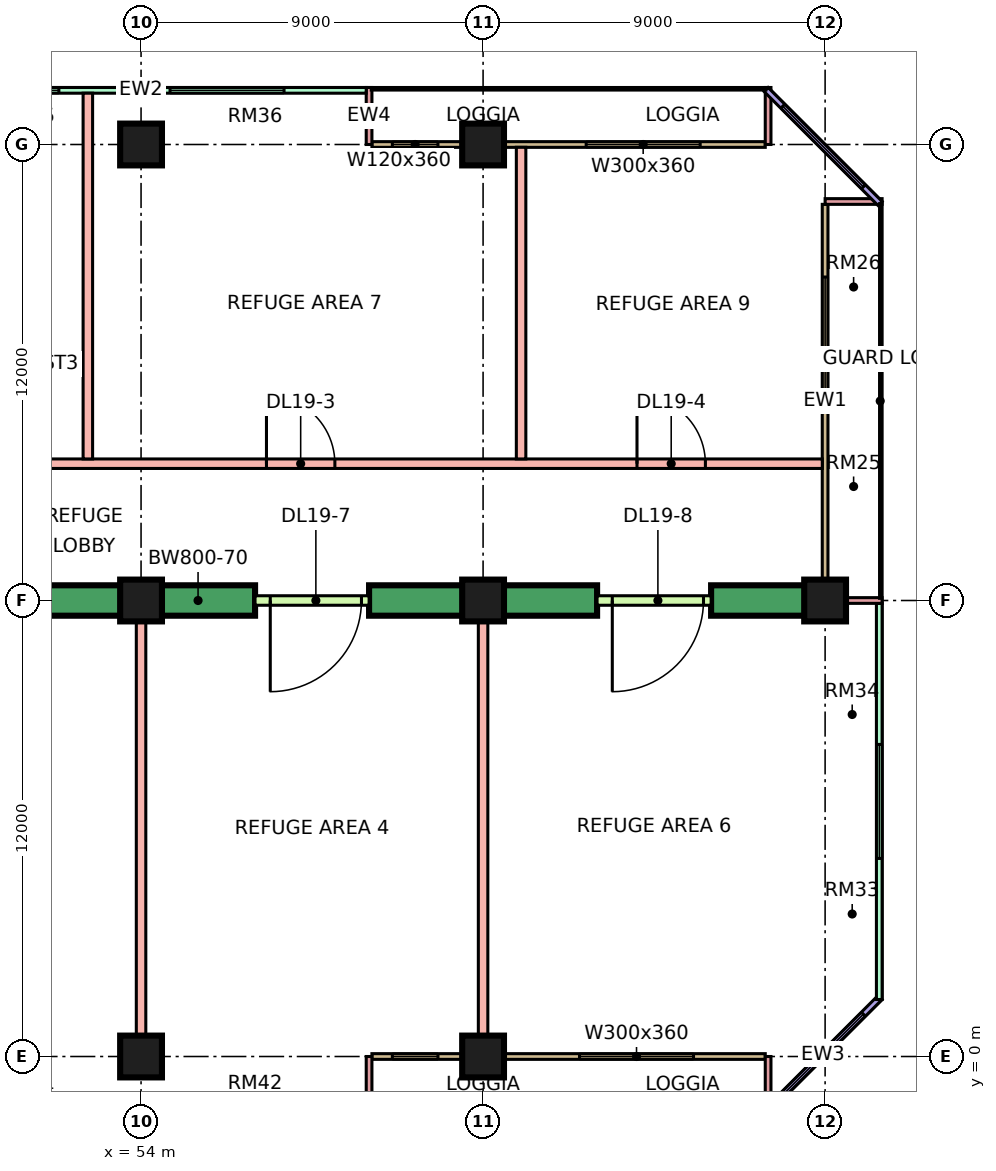
"""IFC4 building model, lengths in metres.
Left out: names, types, materials, properties, quantities, classifications, styles, units other than length and angle.
Written with IfcOpenShell. Run it as: python <this file> out.ifc"""

import sys

from ifc_helpers import new_model, si_unit, direction, frame, frame_2d, origin, origin_2d, place, context, subcontext, project, spatial, rectangle, extrude, element, fill, save


model = new_model("IFC4")
c1 = context("Model", 3, precision=1e-05, world=origin(), true_north=direction((0.0, 1.0)))
c2 = subcontext(c1, "Body", "Model", "MODEL_VIEW")
j1 = project(units=[si_unit("LENGTHUNIT", "METRE"), si_unit("PLANEANGLEUNIT", "RADIAN")], contexts=[c1])
p1 = place(None, origin())
s1 = spatial("IfcSite", under=j1, at=p1, CompositionType="ELEMENT")
p2 = place(p1, origin())
s2 = spatial("IfcBuilding", under=s1, at=p2, CompositionType="ELEMENT")
p3 = place(p2, frame((0.0, 0.0, 86.4)))
s3 = spatial("IfcBuildingStorey", under=s2, at=p3, CompositionType="ELEMENT", Elevation=86.4)
p4 = place(p3, frame((54.0, 0.0, 0.0), z_axis=(0.0, 0.0, 1.0), x_axis=(1.0, 0.0, 0.0)))
e1 = element("IfcColumn", 1, at=p4, inside=s3, PredefinedType="COLUMN", context=c2, shape_type="SweptSolid", body=[
    extrude(rectangle(XDim=1.1, YDim=1.1, at=origin_2d()), origin(), (0.0, 0.0, 1.0), 5.5),
])
p5 = place(p3, frame((54.0, 12.0, 0.0), z_axis=(0.0, 0.0, 1.0), x_axis=(1.0, 0.0, 0.0)))
e2 = element("IfcColumn", 2, at=p5, inside=s3, PredefinedType="COLUMN", context=c2, shape_type="SweptSolid", body=[
    extrude(rectangle(XDim=1.1, YDim=1.1, at=origin_2d()), origin(), (0.0, 0.0, 1.0), 5.5),
])
for number, where, z_axis, x_axis in (
    (3, (54.0, 24.0, 0.0), (0.0, 0.0, 1.0), (1.0, 0.0, 0.0)),
    (4, (63.0, 0.0, 0.0), (0.0, 0.0, 1.0), (1.0, 0.0, 0.0)),
):
    element("IfcColumn", number, at=place(p3, frame(where, z_axis=z_axis, x_axis=x_axis)), inside=s3, PredefinedType="COLUMN", context=c2, shape_type="SweptSolid", body=[
        extrude(rectangle(XDim=1.1, YDim=1.1, at=origin_2d()), origin(), (0.0, 0.0, 1.0), 5.5),
    ])
p6 = place(p3, frame((63.0, 12.0, 0.0), z_axis=(0.0, 0.0, 1.0), x_axis=(1.0, 0.0, 0.0)))
e5 = element("IfcColumn", 5, at=p6, inside=s3, PredefinedType="COLUMN", context=c2, shape_type="SweptSolid", body=[
    extrude(rectangle(XDim=1.1, YDim=1.1, at=origin_2d()), origin(), (0.0, 0.0, 1.0), 5.5),
])
for number, where, z_axis, x_axis in (
    (6, (63.0, 24.0, 0.0), (0.0, 0.0, 1.0), (1.0, 0.0, 0.0)),
    (7, (72.0, 12.0, 0.0), (0.0, 0.0, 1.0), (1.0, 0.0, 0.0)),
):
    element("IfcColumn", number, at=place(p3, frame(where, z_axis=z_axis, x_axis=x_axis)), inside=s3, PredefinedType="COLUMN", context=c2, shape_type="SweptSolid", body=[
        extrude(rectangle(XDim=1.1, YDim=1.1, at=origin_2d()), origin(), (0.0, 0.0, 1.0), 5.5),
    ])
p7 = place(p3, frame((51.0, 12.0, 0.0), z_axis=(0.0, 0.0, 1.0), x_axis=(1.0, 0.0, 0.0)))
e8 = element("IfcWall", 8, at=p7, inside=s3, PredefinedType="SHEAR", context=c2, shape_type="SweptSolid", body=[
    extrude(rectangle(XDim=3.0, YDim=0.8, at=frame_2d((1.5, 0.0))), origin(), (0.0, 0.0, 1.0), 5.1),
])
e9 = element("IfcWall", 9, at=p5, inside=s3, PredefinedType="SHEAR", context=c2, shape_type="SweptSolid", body=[
    extrude(rectangle(XDim=3.0, YDim=0.8, at=frame_2d((1.5, 0.0))), origin(), (0.0, 0.0, 1.0), 5.1),
])
p8 = place(p3, frame((60.0, 12.0, 0.0), z_axis=(0.0, 0.0, 1.0), x_axis=(1.0, 0.0, 0.0)))
e10 = element("IfcWall", 10, at=p8, inside=s3, PredefinedType="SHEAR", context=c2, shape_type="SweptSolid", body=[
    extrude(rectangle(XDim=3.0, YDim=0.8, at=frame_2d((1.5, 0.0))), origin(), (0.0, 0.0, 1.0), 5.1),
])
e11 = element("IfcWall", 11, at=p6, inside=s3, PredefinedType="SHEAR", context=c2, shape_type="SweptSolid", body=[
    extrude(rectangle(XDim=3.0, YDim=0.8, at=frame_2d((1.5, 0.0))), origin(), (0.0, 0.0, 1.0), 5.1),
])
p9 = place(p3, frame((69.0, 12.0, 0.0), z_axis=(0.0, 0.0, 1.0), x_axis=(1.0, 0.0, 0.0)))
e12 = element("IfcWall", 12, at=p9, inside=s3, PredefinedType="SHEAR", context=c2, shape_type="SweptSolid", body=[
    extrude(rectangle(XDim=3.0, YDim=0.8, at=frame_2d((1.5, 0.0))), origin(), (0.0, 0.0, 1.0), 5.1),
])
p10 = place(p3, frame((70.425, 24.0, 0.0), z_axis=(0.0, 0.0, 1.0), x_axis=(-1.0, 0.0, 0.0)))
e13 = element("IfcWall", 13, at=p10, inside=s3, PredefinedType="SOLIDWALL", context=c2, shape_type="SweptSolid", body=[
    extrude(rectangle(XDim=10.35, YDim=0.15, at=frame_2d((5.175, 0.0))), origin(), (0.0, 0.0, 1.0), 5.1),
])
p11 = place(p10, frame((1.712, 0.0, 0.45)))
e14 = element("IfcOpeningElement", 14, at=p11, cuts=e13, PredefinedType="OPENING", context=c2, shape_type="SweptSolid", body=[
    extrude(rectangle(XDim=3.0, YDim=3.6, at=frame_2d((1.5, 1.8))), frame((0.0, 0.085, 0.0), z_axis=(0.0, -1.0, 0.0), x_axis=(1.0, 0.0, 0.0)), (0.0, 0.0, 1.0), 0.17),
])
p12 = place(p10, frame((8.613, 0.0, 0.45)))
e15 = element("IfcOpeningElement", 15, at=p12, cuts=e13, PredefinedType="OPENING", context=c2, shape_type="SweptSolid", body=[
    extrude(rectangle(XDim=1.2, YDim=3.6, at=frame_2d((0.6, 1.8))), frame((0.0, 0.085, 0.0), z_axis=(0.0, -1.0, 0.0), x_axis=(1.0, 0.0, 0.0)), (0.0, 0.0, 1.0), 0.17),
])
for number, where, z_axis, x_axis in (
    (16, (70.5, 25.5, 0.0), (0.0, 0.0, 1.0), (0.0, -1.0, 0.0)),
    (17, (60.0, 25.5, 0.0), (0.0, 0.0, 1.0), (0.0, -1.0, 0.0)),
):
    element("IfcWall", number, at=place(p3, frame(where, z_axis=z_axis, x_axis=x_axis)), inside=s3, PredefinedType="SOLIDWALL", context=c2, shape_type="SweptSolid", body=[
        extrude(rectangle(XDim=1.5, YDim=0.15, at=frame_2d((0.75, 0.0))), origin(), (0.0, 0.0, 1.0), 5.1),
    ])
p13 = place(p3, frame((59.925, 25.425, 0.0), z_axis=(0.0, 0.0, 1.0), x_axis=(-1.0, 0.0, 0.0)))
e18 = element("IfcWall", 18, at=p13, inside=s3, PredefinedType="SOLIDWALL", context=c2, shape_type="SweptSolid", body=[
    extrude(rectangle(XDim=11.85, YDim=0.15, at=frame_2d((5.925, 0.0))), origin(), (0.0, 0.0, 1.0), 5.1),
])
p14 = place(p13, frame((2.163, 0.0, 0.45)))
e19 = element("IfcOpeningElement", 19, at=p14, cuts=e18, PredefinedType="OPENING", context=c2, shape_type="SweptSolid", body=[
    extrude(rectangle(XDim=3.0, YDim=3.6, at=frame_2d((1.5, 1.8))), frame((0.0, 0.085, 0.0), z_axis=(0.0, -1.0, 0.0), x_axis=(1.0, 0.0, 0.0)), (0.0, 0.0, 1.0), 0.17),
])
p15 = place(p13, frame((8.087, 0.0, 0.45)))
e20 = element("IfcOpeningElement", 20, at=p15, cuts=e18, PredefinedType="OPENING", context=c2, shape_type="SweptSolid", body=[
    extrude(rectangle(XDim=3.0, YDim=3.6, at=frame_2d((1.5, 1.8))), frame((0.0, 0.085, 0.0), z_axis=(0.0, -1.0, 0.0), x_axis=(1.0, 0.0, 0.0)), (0.0, 0.0, 1.0), 0.17),
])
p16 = place(p3, frame((60.075, 0.0, 0.0), z_axis=(0.0, 0.0, 1.0), x_axis=(1.0, 0.0, 0.0)))
e21 = element("IfcWall", 21, at=p16, inside=s3, PredefinedType="SOLIDWALL", context=c2, shape_type="SweptSolid", body=[
    extrude(rectangle(XDim=10.35, YDim=0.15, at=frame_2d((5.175, 0.0))), origin(), (0.0, 0.0, 1.0), 5.1),
])
p17 = place(p16, frame((0.538, 0.0, 0.45)))
e22 = element("IfcOpeningElement", 22, at=p17, cuts=e21, PredefinedType="OPENING", context=c2, shape_type="SweptSolid", body=[
    extrude(rectangle(XDim=1.2, YDim=3.6, at=frame_2d((0.6, 1.8))), frame((0.0, 0.085, 0.0), z_axis=(0.0, -1.0, 0.0), x_axis=(1.0, 0.0, 0.0)), (0.0, 0.0, 1.0), 0.17),
])
p18 = place(p16, frame((5.462, 0.0, 0.45)))
e23 = element("IfcOpeningElement", 23, at=p18, cuts=e21, PredefinedType="OPENING", context=c2, shape_type="SweptSolid", body=[
    extrude(rectangle(XDim=3.0, YDim=3.6, at=frame_2d((1.5, 1.8))), frame((0.0, 0.085, 0.0), z_axis=(0.0, -1.0, 0.0), x_axis=(1.0, 0.0, 0.0)), (0.0, 0.0, 1.0), 0.17),
])
for number, where, z_axis, x_axis in (
    (24, (60.0, -1.5, 0.0), (0.0, 0.0, 1.0), (0.0, 1.0, 0.0)),
    (25, (70.5, -1.5, 0.0), (0.0, 0.0, 1.0), (0.0, 1.0, 0.0)),
):
    element("IfcWall", number, at=place(p3, frame(where, z_axis=z_axis, x_axis=x_axis)), inside=s3, PredefinedType="SOLIDWALL", context=c2, shape_type="SweptSolid", body=[
        extrude(rectangle(XDim=1.5, YDim=0.15, at=frame_2d((0.75, 0.0))), origin(), (0.0, 0.0, 1.0), 5.1),
    ])
p19 = place(p3, frame((70.447, -1.447, 0.0), z_axis=(0.0, 0.0, 1.0), x_axis=(0.707106781187, 0.707106781187, 0.0)))
e26 = element("IfcWall", 26, at=p19, inside=s3, PredefinedType="SOLIDWALL", context=c2, shape_type="SweptSolid", body=[
    extrude(rectangle(XDim=4.243, YDim=0.15, at=frame_2d((2.121, 0.0))), origin(), (0.0, 0.0, 1.0), 5.1),
])
p20 = place(p19, frame((0.621, 0.0, 0.45)))
e27 = element("IfcOpeningElement", 27, at=p20, cuts=e26, PredefinedType="OPENING", context=c2, shape_type="SweptSolid", body=[
    extrude(rectangle(XDim=3.0, YDim=3.6, at=frame_2d((1.5, 1.8))), frame((0.0, 0.085, 0.0), z_axis=(0.0, -1.0, 0.0), x_axis=(1.0, 0.0, 0.0)), (0.0, 0.0, 1.0), 0.17),
])
p21 = place(p3, frame((73.425, 1.5, 0.0), z_axis=(0.0, 0.0, 1.0), x_axis=(0.0, 1.0, 0.0)))
e28 = element("IfcWall", 28, at=p21, inside=s3, PredefinedType="SOLIDWALL", context=c2, shape_type="SweptSolid", body=[
    extrude(rectangle(XDim=10.425, YDim=0.15, at=frame_2d((5.212, 0.0))), origin(), (0.0, 0.0, 1.0), 5.1),
])
p22 = place(p21, frame((3.712, 0.0, 0.45)))
e29 = element("IfcOpeningElement", 29, at=p22, cuts=e28, PredefinedType="OPENING", context=c2, shape_type="SweptSolid", body=[
    extrude(rectangle(XDim=3.0, YDim=3.6, at=frame_2d((1.5, 1.8))), frame((0.0, 0.085, 0.0), z_axis=(0.0, -1.0, 0.0), x_axis=(1.0, 0.0, 0.0)), (0.0, 0.0, 1.0), 0.17),
])
p23 = place(p3, frame((72.0, 12.075, 0.0), z_axis=(0.0, 0.0, 1.0), x_axis=(0.0, 1.0, 0.0)))
e30 = element("IfcWall", 30, at=p23, inside=s3, PredefinedType="SOLIDWALL", context=c2, shape_type="SweptSolid", body=[
    extrude(rectangle(XDim=10.35, YDim=0.15, at=frame_2d((5.175, 0.0))), origin(), (0.0, 0.0, 1.0), 5.1),
])
p24 = place(p23, frame((5.438, 0.0, 0.45)))
e31 = element("IfcOpeningElement", 31, at=p24, cuts=e30, PredefinedType="OPENING", context=c2, shape_type="SweptSolid", body=[
    extrude(rectangle(XDim=3.0, YDim=3.6, at=frame_2d((1.5, 1.8))), frame((0.0, 0.085, 0.0), z_axis=(0.0, -1.0, 0.0), x_axis=(1.0, 0.0, 0.0)), (0.0, 0.0, 1.0), 0.17),
])
for number, where, z_axis, x_axis in (
    (32, (73.5, 12.0, 0.0), (0.0, 0.0, 1.0), (-1.0, 0.0, 0.0)),
    (33, (73.5, 22.5, 0.0), (0.0, 0.0, 1.0), (-1.0, 0.0, 0.0)),
):
    element("IfcWall", number, at=place(p3, frame(where, z_axis=z_axis, x_axis=x_axis)), inside=s3, PredefinedType="SOLIDWALL", context=c2, shape_type="SweptSolid", body=[
        extrude(rectangle(XDim=1.5, YDim=0.15, at=frame_2d((0.75, 0.0))), origin(), (0.0, 0.0, 1.0), 5.1),
    ])
p25 = place(p3, frame((73.447, 22.447, 0.0), z_axis=(0.0, 0.0, 1.0), x_axis=(-0.707106781187, 0.707106781187, 0.0)))
e34 = element("IfcWall", 34, at=p25, inside=s3, PredefinedType="SOLIDWALL", context=c2, shape_type="SweptSolid", body=[
    extrude(rectangle(XDim=4.243, YDim=0.15, at=frame_2d((2.121, 0.0))), origin(), (0.0, 0.0, 1.0), 5.1),
])
p26 = place(p25, frame((0.621, 0.0, 0.45)))
e35 = element("IfcOpeningElement", 35, at=p26, cuts=e34, PredefinedType="OPENING", context=c2, shape_type="SweptSolid", body=[
    extrude(rectangle(XDim=3.0, YDim=3.6, at=frame_2d((1.5, 1.8))), frame((0.0, 0.085, 0.0), z_axis=(0.0, -1.0, 0.0), x_axis=(1.0, 0.0, 0.0)), (0.0, 0.0, 1.0), 0.17),
])
p27 = place(p3, frame((51.225, 15.6, 0.0), z_axis=(0.0, 0.0, 1.0), x_axis=(1.0, 0.0, 0.0)))
e36 = element("IfcWall", 36, at=p27, inside=s3, PredefinedType="PARTITIONING", context=c2, shape_type="SweptSolid", body=[
    extrude(rectangle(XDim=20.701, YDim=0.25, at=frame_2d((10.351, 0.0))), origin(), (0.0, 0.0, 1.0), 5.1),
])
p28 = place(p27, frame((6.075, 0.0, 0.0)))
e37 = element("IfcOpeningElement", 37, at=p28, cuts=e36, PredefinedType="OPENING", context=c2, shape_type="SweptSolid", body=[
    extrude(rectangle(XDim=1.8, YDim=2.1, at=frame_2d((0.9, 1.05))), frame((0.0, 0.135, 0.0), z_axis=(0.0, -1.0, 0.0), x_axis=(1.0, 0.0, 0.0)), (0.0, 0.0, 1.0), 0.27),
])
p29 = place(p27, frame((15.825, 0.0, 0.0)))
e38 = element("IfcOpeningElement", 38, at=p29, cuts=e36, PredefinedType="OPENING", context=c2, shape_type="SweptSolid", body=[
    extrude(rectangle(XDim=1.8, YDim=2.1, at=frame_2d((0.9, 1.05))), frame((0.0, 0.135, 0.0), z_axis=(0.0, -1.0, 0.0), x_axis=(1.0, 0.0, 0.0)), (0.0, 0.0, 1.0), 0.27),
])
p30 = place(p3, frame((52.6, 15.725, 0.0), z_axis=(0.0, 0.0, 1.0), x_axis=(0.0, 1.0, 0.0)))
e39 = element("IfcWall", 39, at=p30, inside=s3, PredefinedType="PARTITIONING", context=c2, shape_type="SweptSolid", body=[
    extrude(rectangle(XDim=9.625, YDim=0.25, at=frame_2d((4.812, 0.0))), origin(), (0.0, 0.0, 1.0), 5.1),
])
p31 = place(p3, frame((54.0, 0.0, 0.0), z_axis=(0.0, 0.0, 1.0), x_axis=(0.0, 1.0, 0.0)))
e40 = element("IfcWall", 40, at=p31, inside=s3, PredefinedType="PARTITIONING", context=c2, shape_type="SweptSolid", body=[
    extrude(rectangle(XDim=11.601, YDim=0.25, at=frame_2d((5.801, 0.0))), origin(), (0.0, 0.0, 1.0), 5.1),
])
p32 = place(p3, frame((56.999, 12.0, 0.0), z_axis=(0.0, 0.0, 1.0), x_axis=(1.0, 0.0, 0.0)))
e41 = element("IfcWall", 41, at=p32, inside=s3, PredefinedType="PARTITIONING", context=c2, shape_type="SweptSolid", body=[
    extrude(rectangle(XDim=3.002, YDim=0.25, at=frame_2d((1.501, 0.0))), origin(), (0.0, 0.0, 1.0), 3.05),
])
p33 = place(p32, frame((0.401, 0.0, 0.0)))
e42 = element("IfcOpeningElement", 42, at=p33, cuts=e41, PredefinedType="OPENING", context=c2, shape_type="SweptSolid", body=[
    extrude(rectangle(XDim=2.4, YDim=2.1, at=frame_2d((1.2, 1.05))), frame((0.0, 0.135, 0.0), z_axis=(0.0, -1.0, 0.0), x_axis=(1.0, 0.0, 0.0)), (0.0, 0.0, 1.0), 0.27),
])
p34 = place(p3, frame((63.0, 0.074, 0.0), z_axis=(0.0, 0.0, 1.0), x_axis=(0.0, 1.0, 0.0)))
e43 = element("IfcWall", 43, at=p34, inside=s3, PredefinedType="PARTITIONING", context=c2, shape_type="SweptSolid", body=[
    extrude(rectangle(XDim=11.527, YDim=0.25, at=frame_2d((5.764, 0.0))), origin(), (0.0, 0.0, 1.0), 5.1),
])
p35 = place(p3, frame((64.0, 15.725, 0.0), z_axis=(0.0, 0.0, 1.0), x_axis=(0.0, 1.0, 0.0)))
e44 = element("IfcWall", 44, at=p35, inside=s3, PredefinedType="PARTITIONING", context=c2, shape_type="SweptSolid", body=[
    extrude(rectangle(XDim=8.201, YDim=0.25, at=frame_2d((4.101, 0.0))), origin(), (0.0, 0.0, 1.0), 5.1),
])
p36 = place(p3, frame((65.999, 12.0, 0.0), z_axis=(0.0, 0.0, 1.0), x_axis=(1.0, 0.0, 0.0)))
e45 = element("IfcWall", 45, at=p36, inside=s3, PredefinedType="PARTITIONING", context=c2, shape_type="SweptSolid", body=[
    extrude(rectangle(XDim=3.002, YDim=0.25, at=frame_2d((1.501, 0.0))), origin(), (0.0, 0.0, 1.0), 3.05),
])
p37 = place(p36, frame((0.401, 0.0, 0.0)))
e46 = element("IfcOpeningElement", 46, at=p37, cuts=e45, PredefinedType="OPENING", context=c2, shape_type="SweptSolid", body=[
    extrude(rectangle(XDim=2.4, YDim=2.1, at=frame_2d((1.2, 1.05))), frame((0.0, 0.135, 0.0), z_axis=(0.0, -1.0, 0.0), x_axis=(1.0, 0.0, 0.0)), (0.0, 0.0, 1.0), 0.27),
])
p38 = place(p11, origin())
e47 = element("IfcWindow", 47, at=p38, inside=s3, PartitioningType="SINGLE_PANEL", PredefinedType="WINDOW", context=c2, shape_type="SweptSolid", body=[
    extrude(rectangle(XDim=3.0, YDim=3.6, at=frame_2d((1.5, 1.8))), frame((0.0, 0.03, 0.0), z_axis=(0.0, -1.0, 0.0), x_axis=(1.0, 0.0, 0.0)), (0.0, 0.0, 1.0), 0.06),
])
fill(e14, e47)
p39 = place(p12, origin())
e48 = element("IfcWindow", 48, at=p39, inside=s3, PartitioningType="SINGLE_PANEL", PredefinedType="WINDOW", context=c2, shape_type="SweptSolid", body=[
    extrude(rectangle(XDim=1.2, YDim=3.6, at=frame_2d((0.6, 1.8))), frame((0.0, 0.03, 0.0), z_axis=(0.0, -1.0, 0.0), x_axis=(1.0, 0.0, 0.0)), (0.0, 0.0, 1.0), 0.06),
])
fill(e15, e48)
p40 = place(p14, origin())
e49 = element("IfcWindow", 49, at=p40, inside=s3, PartitioningType="SINGLE_PANEL", PredefinedType="WINDOW", context=c2, shape_type="SweptSolid", body=[
    extrude(rectangle(XDim=3.0, YDim=3.6, at=frame_2d((1.5, 1.8))), frame((0.0, 0.03, 0.0), z_axis=(0.0, -1.0, 0.0), x_axis=(1.0, 0.0, 0.0)), (0.0, 0.0, 1.0), 0.06),
])
fill(e19, e49)
p41 = place(p15, origin())
e50 = element("IfcWindow", 50, at=p41, inside=s3, PartitioningType="SINGLE_PANEL", PredefinedType="WINDOW", context=c2, shape_type="SweptSolid", body=[
    extrude(rectangle(XDim=3.0, YDim=3.6, at=frame_2d((1.5, 1.8))), frame((0.0, 0.03, 0.0), z_axis=(0.0, -1.0, 0.0), x_axis=(1.0, 0.0, 0.0)), (0.0, 0.0, 1.0), 0.06),
])
fill(e20, e50)
p42 = place(p17, origin())
e51 = element("IfcWindow", 51, at=p42, inside=s3, PartitioningType="SINGLE_PANEL", PredefinedType="WINDOW", context=c2, shape_type="SweptSolid", body=[
    extrude(rectangle(XDim=1.2, YDim=3.6, at=frame_2d((0.6, 1.8))), frame((0.0, 0.03, 0.0), z_axis=(0.0, -1.0, 0.0), x_axis=(1.0, 0.0, 0.0)), (0.0, 0.0, 1.0), 0.06),
])
fill(e22, e51)
p43 = place(p18, origin())
e52 = element("IfcWindow", 52, at=p43, inside=s3, PartitioningType="SINGLE_PANEL", PredefinedType="WINDOW", context=c2, shape_type="SweptSolid", body=[
    extrude(rectangle(XDim=3.0, YDim=3.6, at=frame_2d((1.5, 1.8))), frame((0.0, 0.03, 0.0), z_axis=(0.0, -1.0, 0.0), x_axis=(1.0, 0.0, 0.0)), (0.0, 0.0, 1.0), 0.06),
])
fill(e23, e52)
p44 = place(p20, origin())
e53 = element("IfcWindow", 53, at=p44, inside=s3, PartitioningType="SINGLE_PANEL", PredefinedType="WINDOW", context=c2, shape_type="SweptSolid", body=[
    extrude(rectangle(XDim=3.0, YDim=3.6, at=frame_2d((1.5, 1.8))), frame((0.0, 0.03, 0.0), z_axis=(0.0, -1.0, 0.0), x_axis=(1.0, 0.0, 0.0)), (0.0, 0.0, 1.0), 0.06),
])
fill(e27, e53)
p45 = place(p22, origin())
e54 = element("IfcWindow", 54, at=p45, inside=s3, PartitioningType="SINGLE_PANEL", PredefinedType="WINDOW", context=c2, shape_type="SweptSolid", body=[
    extrude(rectangle(XDim=3.0, YDim=3.6, at=frame_2d((1.5, 1.8))), frame((0.0, 0.03, 0.0), z_axis=(0.0, -1.0, 0.0), x_axis=(1.0, 0.0, 0.0)), (0.0, 0.0, 1.0), 0.06),
])
fill(e29, e54)
p46 = place(p24, origin())
e55 = element("IfcWindow", 55, at=p46, inside=s3, PartitioningType="SINGLE_PANEL", PredefinedType="WINDOW", context=c2, shape_type="SweptSolid", body=[
    extrude(rectangle(XDim=3.0, YDim=3.6, at=frame_2d((1.5, 1.8))), frame((0.0, 0.03, 0.0), z_axis=(0.0, -1.0, 0.0), x_axis=(1.0, 0.0, 0.0)), (0.0, 0.0, 1.0), 0.06),
])
fill(e31, e55)
p47 = place(p26, origin())
e56 = element("IfcWindow", 56, at=p47, inside=s3, PartitioningType="SINGLE_PANEL", PredefinedType="WINDOW", context=c2, shape_type="SweptSolid", body=[
    extrude(rectangle(XDim=3.0, YDim=3.6, at=frame_2d((1.5, 1.8))), frame((0.0, 0.03, 0.0), z_axis=(0.0, -1.0, 0.0), x_axis=(1.0, 0.0, 0.0)), (0.0, 0.0, 1.0), 0.06),
])
fill(e35, e56)
p48 = place(p28, origin())
e57 = element("IfcDoor", 57, at=p48, inside=s3, OperationType="DOUBLE_DOOR_SINGLE_SWING", PredefinedType="DOOR", context=c2, shape_type="SweptSolid", body=[
    extrude(rectangle(XDim=1.8, YDim=2.1, at=frame_2d((0.9, 1.05))), frame((0.0, 0.025, 0.0), z_axis=(0.0, -1.0, 0.0), x_axis=(1.0, 0.0, 0.0)), (0.0, 0.0, 1.0), 0.05),
])
fill(e37, e57)
p49 = place(p29, origin())
e58 = element("IfcDoor", 58, at=p49, inside=s3, OperationType="DOUBLE_DOOR_SINGLE_SWING", PredefinedType="DOOR", context=c2, shape_type="SweptSolid", body=[
    extrude(rectangle(XDim=1.8, YDim=2.1, at=frame_2d((0.9, 1.05))), frame((0.0, 0.025, 0.0), z_axis=(0.0, -1.0, 0.0), x_axis=(1.0, 0.0, 0.0)), (0.0, 0.0, 1.0), 0.05),
])
fill(e38, e58)
p50 = place(p33, frame((2.4, 0.0, 0.0), z_axis=(0.0, 0.0, 1.0), x_axis=(-1.0, 0.0, 0.0)))
e59 = element("IfcDoor", 59, at=p50, inside=s3, OperationType="DOUBLE_DOOR_SINGLE_SWING", PredefinedType="DOOR", context=c2, shape_type="SweptSolid", body=[
    extrude(rectangle(XDim=2.4, YDim=2.1, at=frame_2d((1.2, 1.05))), frame((0.0, 0.025, 0.0), z_axis=(0.0, -1.0, 0.0), x_axis=(1.0, 0.0, 0.0)), (0.0, 0.0, 1.0), 0.05),
])
fill(e42, e59)
p51 = place(p37, frame((2.4, 0.0, 0.0), z_axis=(0.0, 0.0, 1.0), x_axis=(-1.0, 0.0, 0.0)))
e60 = element("IfcDoor", 60, at=p51, inside=s3, OperationType="DOUBLE_DOOR_SINGLE_SWING", PredefinedType="DOOR", context=c2, shape_type="SweptSolid", body=[
    extrude(rectangle(XDim=2.4, YDim=2.1, at=frame_2d((1.2, 1.05))), frame((0.0, 0.025, 0.0), z_axis=(0.0, -1.0, 0.0), x_axis=(1.0, 0.0, 0.0)), (0.0, 0.0, 1.0), 0.05),
])
fill(e46, e60)
save(model, sys.argv[1])
